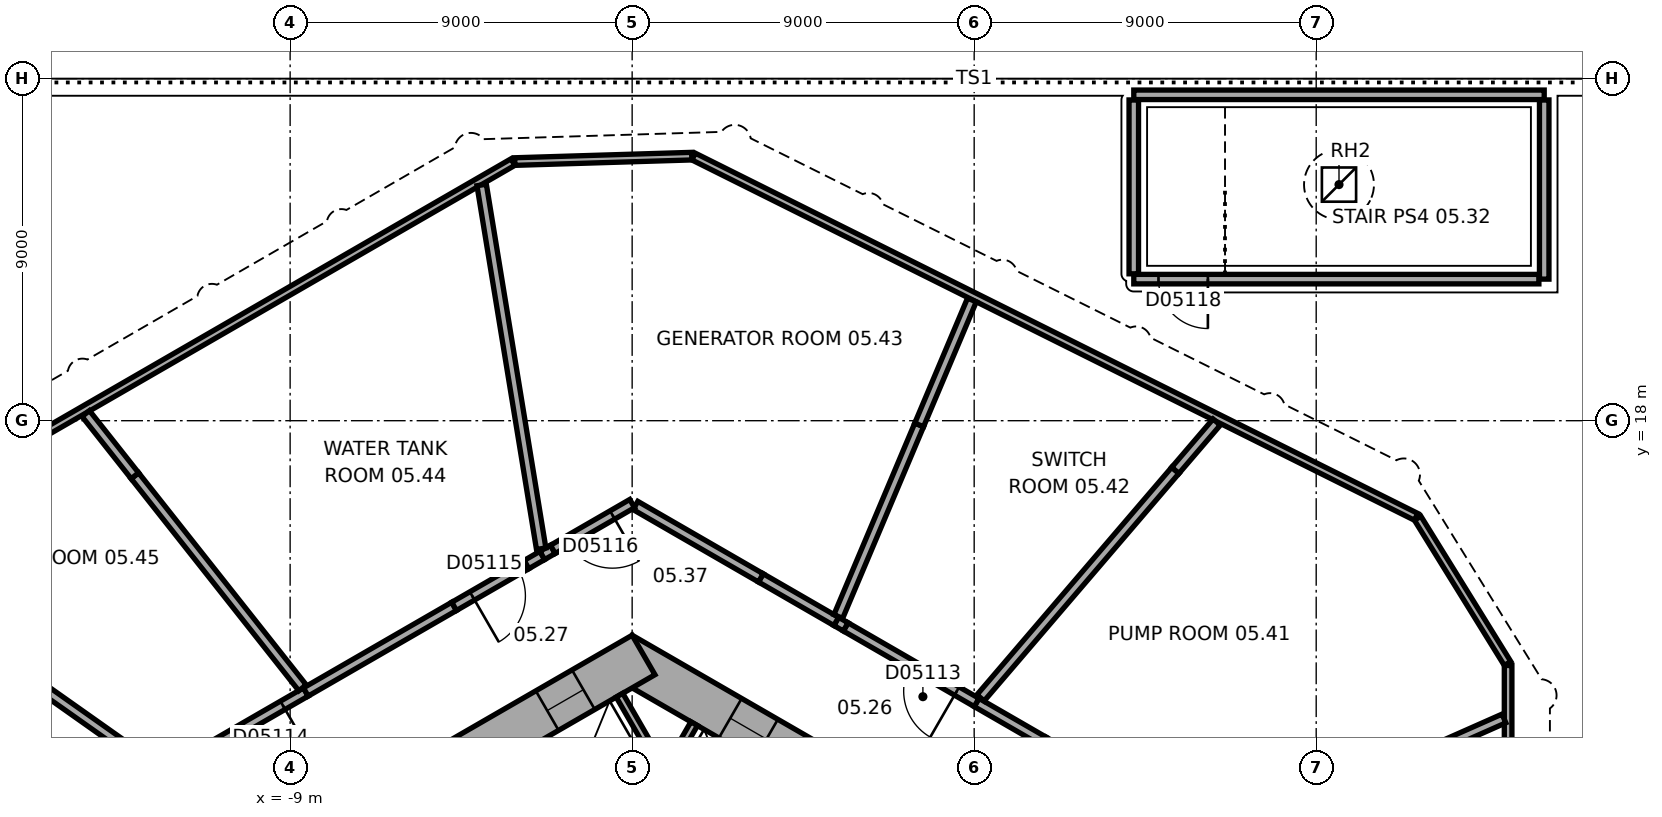
"""IFC4 building model, lengths in metres.
Left out: names, types, materials, properties, quantities, classifications, styles, units other than length and angle.
Written with IfcOpenShell. Run it as: python <this file> out.ifc"""

import sys

from ifc_helpers import new_model, si_unit, direction, frame, frame_2d, origin, origin_2d, place, context, subcontext, project, spatial, rectangle, extrude, element, fill, save


model = new_model("IFC4")
c1 = context("Model", 3, precision=1e-05, world=origin(), true_north=direction((0.0, 1.0)))
c2 = subcontext(c1, "Body", "Model", "MODEL_VIEW")
j1 = project(units=[si_unit("LENGTHUNIT", "METRE"), si_unit("PLANEANGLEUNIT", "RADIAN")], contexts=[c1])
p1 = place(None, origin())
s1 = spatial("IfcSite", under=j1, at=p1, CompositionType="ELEMENT")
p2 = place(p1, origin())
s2 = spatial("IfcBuilding", under=s1, at=p2, CompositionType="ELEMENT")
p3 = place(p2, frame((0.0, 0.0, 34.5)))
s3 = spatial("IfcBuildingStorey", under=s2, at=p3, CompositionType="ELEMENT", Elevation=34.5)
p4 = place(p3, frame((10.4, 5.658, 0.0), z_axis=(0.0, 0.0, 1.0), x_axis=(-0.866021384402, 0.500006961711, 0.0)))
e1 = element("IfcWall", 1, at=p4, inside=s3, PredefinedType="SHEAR", context=c2, shape_type="SweptSolid", body=[
    extrude(rectangle(XDim=12.355, YDim=1.2, at=frame_2d((6.178, 0.0))), origin(), (0.0, 0.0, 1.0), 4.5),
])
p5 = place(p4, frame((2.728, 0.0, 0.0)))
e2 = element("IfcOpeningElement", 2, at=p5, cuts=e1, PredefinedType="OPENING", context=c2, shape_type="SweptSolid", body=[
    extrude(rectangle(XDim=1.1, YDim=2.1, at=frame_2d((0.55, 1.05))), frame((0.0, 0.61, 0.0), z_axis=(0.0, -1.0, 0.0), x_axis=(1.0, 0.0, 0.0)), (0.0, 0.0, 1.0), 1.22),
])
p6 = place(p4, frame((5.328, 0.0, 0.0)))
e3 = element("IfcOpeningElement", 3, at=p6, cuts=e1, PredefinedType="OPENING", context=c2, shape_type="SweptSolid", body=[
    extrude(rectangle(XDim=1.1, YDim=2.1, at=frame_2d((0.55, 1.05))), frame((0.0, 0.61, 0.0), z_axis=(0.0, -1.0, 0.0), x_axis=(1.0, 0.0, 0.0)), (0.0, 0.0, 1.0), 1.22),
])
p7 = place(p4, frame((7.928, 0.0, 0.0)))
e4 = element("IfcOpeningElement", 4, at=p7, cuts=e1, PredefinedType="OPENING", context=c2, shape_type="SweptSolid", body=[
    extrude(rectangle(XDim=1.1, YDim=2.1, at=frame_2d((0.55, 1.05))), frame((0.0, 0.61, 0.0), z_axis=(0.0, -1.0, 0.0), x_axis=(1.0, 0.0, 0.0)), (0.0, 0.0, 1.0), 1.22),
])
p8 = place(p3, frame((0.3, 11.836, 0.0), z_axis=(0.0, 0.0, 1.0), x_axis=(-0.866021384402, -0.500006961711, 0.0)))
e5 = element("IfcWall", 5, at=p8, inside=s3, PredefinedType="SHEAR", context=c2, shape_type="SweptSolid", body=[
    extrude(rectangle(XDim=12.355, YDim=1.2, at=frame_2d((6.178, 0.0))), origin(), (0.0, 0.0, 1.0), 4.5),
])
p9 = place(p8, frame((6.378, 0.0, 0.0)))
e6 = element("IfcOpeningElement", 6, at=p9, cuts=e5, PredefinedType="OPENING", context=c2, shape_type="SweptSolid", body=[
    extrude(rectangle(XDim=1.5, YDim=2.1, at=frame_2d((0.75, 1.05))), frame((0.0, 0.61, 0.0), z_axis=(0.0, -1.0, 0.0), x_axis=(1.0, 0.0, 0.0)), (0.0, 0.0, 1.0), 1.22),
])
p10 = place(p8, frame((1.828, 0.0, 0.0)))
e7 = element("IfcOpeningElement", 7, at=p10, cuts=e5, PredefinedType="OPENING", context=c2, shape_type="SweptSolid", body=[
    extrude(rectangle(XDim=1.1, YDim=2.1, at=frame_2d((0.55, 1.05))), frame((0.0, 0.61, 0.0), z_axis=(0.0, -1.0, 0.0), x_axis=(1.0, 0.0, 0.0)), (0.0, 0.0, 1.0), 1.22),
])
p11 = place(p3, frame((23.05, -9.687, 0.0), z_axis=(0.0, 0.0, 1.0), x_axis=(0.0, 1.0, 0.0)))
e8 = element("IfcWall", 8, at=p11, inside=s3, PredefinedType="STANDARD", context=c2, shape_type="SweptSolid", body=[
    extrude(rectangle(XDim=21.246, YDim=0.2, at=frame_2d((10.623, 0.0))), origin(), (0.0, 0.0, 1.0), 4.5),
])
p12 = place(p11, frame((10.034, 0.0, 0.0)))
e9 = element("IfcOpeningElement", 9, at=p12, cuts=e8, PredefinedType="OPENING", context=c2, shape_type="SweptSolid", body=[
    extrude(rectangle(XDim=1.8, YDim=2.4, at=frame_2d((0.9, 1.2))), frame((0.0, 0.11, 0.0), z_axis=(0.0, -1.0, 0.0), x_axis=(1.0, 0.0, 0.0)), (0.0, 0.0, 1.0), 0.22),
])
p13 = place(p3, frame((23.035, 11.612, 0.0), z_axis=(0.0, 0.0, 1.0), x_axis=(-0.526160091227, 0.850385535155, 0.0)))
e10 = element("IfcWall", 10, at=p13, inside=s3, PredefinedType="STANDARD", context=c2, shape_type="SweptSolid", body=[
    extrude(rectangle(XDim=4.494, YDim=0.2, at=frame_2d((2.247, 0.0))), origin(), (0.0, 0.0, 1.0), 4.5),
])
p14 = place(p3, frame((20.63, 15.47, 0.0), z_axis=(0.0, 0.0, 1.0), x_axis=(-0.894934518609, 0.446197498203, 0.0)))
e11 = element("IfcWall", 11, at=p14, inside=s3, PredefinedType="STANDARD", context=c2, shape_type="SweptSolid", body=[
    extrude(rectangle(XDim=21.246, YDim=0.2, at=frame_2d((10.623, 0.0))), origin(), (0.0, 0.0, 1.0), 4.5),
])
p15 = place(p3, frame((1.568, 24.961, 0.0), z_axis=(0.0, 0.0, 1.0), x_axis=(-0.999533359013, -0.030546099927, 0.0)))
e12 = element("IfcWall", 12, at=p15, inside=s3, PredefinedType="STANDARD", context=c2, shape_type="SweptSolid", body=[
    extrude(rectangle(XDim=4.66, YDim=0.2, at=frame_2d((2.33, 0.0))), origin(), (0.0, 0.0, 1.0), 4.5),
])
p16 = place(p3, frame((-3.136, 24.805, 0.0), z_axis=(0.0, 0.0, 1.0), x_axis=(-0.866028291626, -0.499994998079, 0.0)))
e13 = element("IfcWall", 13, at=p16, inside=s3, PredefinedType="STANDARD", context=c2, shape_type="SweptSolid", body=[
    extrude(rectangle(XDim=21.246, YDim=0.2, at=frame_2d((10.623, 0.0))), origin(), (0.0, 0.0, 1.0), 4.5),
])
p17 = place(p3, frame((0.532, 8.122, 0.0), z_axis=(0.0, 0.0, 1.0), x_axis=(0.500077893725, 0.86598042715, 0.0)))
e14 = element("IfcWall", 14, at=p17, inside=s3, PredefinedType="PARTITIONING", context=c2, shape_type="SweptSolid", body=[
    extrude(rectangle(XDim=2.2, YDim=0.2, at=frame_2d((1.1, 0.0))), origin(), (0.0, 0.0, 1.0), 4.2),
])
p18 = place(p3, frame((0.767, 8.872, 0.0), z_axis=(0.0, 0.0, 1.0), x_axis=(-0.499994660107, 0.866028486751, 0.0)))
e15 = element("IfcWall", 15, at=p18, inside=s3, PredefinedType="PARTITIONING", context=c2, shape_type="SweptSolid", body=[
    extrude(rectangle(XDim=2.2, YDim=0.2, at=frame_2d((1.1, 0.0))), origin(), (0.0, 0.0, 1.0), 4.2),
])
p19 = place(p3, frame((13.883, 6.152, 0.0), z_axis=(0.0, 0.0, 1.0), x_axis=(0.914277420945, 0.405088629254, 0.0)))
e16 = element("IfcWall", 16, at=p19, inside=s3, PredefinedType="SOLIDWALL", context=c2, shape_type="SweptSolid", body=[
    extrude(rectangle(XDim=9.906, YDim=0.25, at=frame_2d((4.953, 0.0))), origin(), (0.0, 0.0, 1.0), 4.2),
])
p20 = place(p3, frame((10.833, 9.564, 0.0), z_axis=(0.0, 0.0, 1.0), x_axis=(-0.866058244174, 0.499943114462, 0.0)))
e17 = element("IfcWall", 17, at=p20, inside=s3, PredefinedType="SOLIDWALL", context=c2, shape_type="SweptSolid", body=[
    extrude(rectangle(XDim=2.043, YDim=0.25, at=frame_2d((1.021, 0.0))), origin(), (0.0, 0.0, 1.0), 4.2),
])
p21 = place(p3, frame((9.064, 10.586, 0.0), z_axis=(0.0, 0.0, 1.0), x_axis=(-0.865998553266, 0.500046503579, 0.0)))
e18 = element("IfcWall", 18, at=p21, inside=s3, PredefinedType="SOLIDWALL", context=c2, shape_type="SweptSolid", body=[
    extrude(rectangle(XDim=3.978, YDim=0.25, at=frame_2d((1.989, 0.0))), origin(), (0.0, 0.0, 1.0), 4.2),
])
p22 = place(p21, frame((0.6, 0.0, 0.0)))
e19 = element("IfcOpeningElement", 19, at=p22, cuts=e18, PredefinedType="OPENING", context=c2, shape_type="SweptSolid", body=[
    extrude(rectangle(XDim=1.4, YDim=2.1, at=frame_2d((0.7, 1.05))), frame((0.0, 0.135, 0.0), z_axis=(0.0, -1.0, 0.0), x_axis=(1.0, 0.0, 0.0)), (0.0, 0.0, 1.0), 0.27),
])
p23 = place(p3, frame((-8.587, 10.862, 0.0), z_axis=(0.0, 0.0, 1.0), x_axis=(-0.86601248742, -0.500022371132, 0.0)))
e20 = element("IfcWall", 20, at=p23, inside=s3, PredefinedType="SOLIDWALL", context=c2, shape_type="SweptSolid", body=[
    extrude(rectangle(XDim=3.124, YDim=0.25, at=frame_2d((1.562, 0.0))), origin(), (0.0, 0.0, 1.0), 4.2),
])
p24 = place(p23, frame((0.7, 0.0, 0.0)))
e21 = element("IfcOpeningElement", 21, at=p24, cuts=e20, PredefinedType="OPENING", context=c2, shape_type="SweptSolid", body=[
    extrude(rectangle(XDim=1.4, YDim=2.1, at=frame_2d((0.7, 1.05))), frame((0.0, 0.135, 0.0), z_axis=(0.0, -1.0, 0.0), x_axis=(1.0, 0.0, 0.0)), (0.0, 0.0, 1.0), 0.27),
])
p25 = place(p3, frame((-8.587, 10.862, 0.0), z_axis=(0.0, 0.0, 1.0), x_axis=(0.866020461467, 0.500008560247, 0.0)))
e22 = element("IfcWall", 22, at=p25, inside=s3, PredefinedType="SOLIDWALL", context=c2, shape_type="SweptSolid", body=[
    extrude(rectangle(XDim=4.506, YDim=0.25, at=frame_2d((2.253, 0.0))), origin(), (0.0, 0.0, 1.0), 4.2),
])
p26 = place(p3, frame((-15.707, 11.094, 0.0), z_axis=(0.0, 0.0, 1.0), x_axis=(0.816797900082, -0.576923903493, 0.0)))
e23 = element("IfcWall", 23, at=p26, inside=s3, PredefinedType="SOLIDWALL", context=c2, shape_type="SweptSolid", body=[
    extrude(rectangle(XDim=3.942, YDim=0.25, at=frame_2d((1.971, 0.0))), origin(), (0.0, 0.0, 1.0), 4.2),
])
p27 = place(p3, frame((5.619, 12.575, 0.0), z_axis=(0.0, 0.0, 1.0), x_axis=(-0.865775094499, 0.500433297998, 0.0)))
e24 = element("IfcWall", 24, at=p27, inside=s3, PredefinedType="SOLIDWALL", context=c2, shape_type="SweptSolid", body=[
    extrude(rectangle(XDim=0.287, YDim=0.25, at=frame_2d((0.144, 0.0))), origin(), (0.0, 0.0, 1.0), 4.2),
])
p28 = place(p3, frame((-4.685, 13.115, 0.0), z_axis=(0.0, 0.0, 1.0), x_axis=(0.866008176907, 0.50002983664, 0.0)))
e25 = element("IfcWall", 25, at=p28, inside=s3, PredefinedType="SOLIDWALL", context=c2, shape_type="SweptSolid", body=[
    extrude(rectangle(XDim=2.2, YDim=0.25, at=frame_2d((1.1, 0.0))), origin(), (0.0, 0.0, 1.0), 4.2),
])
p29 = place(p28, frame((0.55, 0.0, 0.0)))
e26 = element("IfcOpeningElement", 26, at=p29, cuts=e25, PredefinedType="OPENING", context=c2, shape_type="SweptSolid", body=[
    extrude(rectangle(XDim=1.4, YDim=2.1, at=frame_2d((0.7, 1.05))), frame((0.0, 0.135, 0.0), z_axis=(0.0, -1.0, 0.0), x_axis=(1.0, 0.0, 0.0)), (0.0, 0.0, 1.0), 0.27),
])
p30 = place(p3, frame((3.386, 13.865, 0.0), z_axis=(0.0, 0.0, 1.0), x_axis=(0.866031201001, -0.499989958791, 0.0)))
e27 = element("IfcWall", 27, at=p30, inside=s3, PredefinedType="SOLIDWALL", context=c2, shape_type="SweptSolid", body=[
    extrude(rectangle(XDim=2.291, YDim=0.25, at=frame_2d((1.146, 0.0))), origin(), (0.0, 0.0, 1.0), 4.2),
])
p31 = place(p3, frame((-2.78, 14.215, 0.0), z_axis=(0.0, 0.0, 1.0), x_axis=(0.866007328409, 0.500031306162, 0.0)))
e28 = element("IfcWall", 28, at=p31, inside=s3, PredefinedType="SOLIDWALL", context=c2, shape_type="SweptSolid", body=[
    extrude(rectangle(XDim=0.479, YDim=0.25, at=frame_2d((0.24, 0.0))), origin(), (0.0, 0.0, 1.0), 4.2),
])
p32 = place(p3, frame((-2.365, 14.454, 0.0), z_axis=(0.0, 0.0, 1.0), x_axis=(0.86622356696, 0.499656614129, 0.0)))
e29 = element("IfcWall", 29, at=p32, inside=s3, PredefinedType="SOLIDWALL", context=c2, shape_type="SweptSolid", body=[
    extrude(rectangle(XDim=0.321, YDim=0.25, at=frame_2d((0.161, 0.0))), origin(), (0.0, 0.0, 1.0), 4.2),
])
p33 = place(p3, frame((-2.394, 14.632, 0.0), z_axis=(0.0, 0.0, 1.0), x_axis=(-0.161467170833, 0.986878084032, 0.0)))
e30 = element("IfcWall", 30, at=p33, inside=s3, PredefinedType="SOLIDWALL", context=c2, shape_type="SweptSolid", body=[
    extrude(rectangle(XDim=9.698, YDim=0.25, at=frame_2d((4.849, 0.0))), origin(), (0.0, 0.0, 1.0), 3.4),
])
p34 = place(p3, frame((0.087, 15.77, 0.0), z_axis=(0.0, 0.0, 1.0), x_axis=(0.866006299436, -0.500033088242, 0.0)))
e31 = element("IfcWall", 31, at=p34, inside=s3, PredefinedType="SOLIDWALL", context=c2, shape_type="SweptSolid", body=[
    extrude(rectangle(XDim=3.81, YDim=0.25, at=frame_2d((1.905, 0.0))), origin(), (0.0, 0.0, 1.0), 4.2),
])
p35 = place(p3, frame((0.0, 15.82, 0.0), z_axis=(0.0, 0.0, 1.0), x_axis=(-0.86598987286, -0.500061536317, 0.0)))
e32 = element("IfcWall", 32, at=p35, inside=s3, PredefinedType="SOLIDWALL", context=c2, shape_type="SweptSolid", body=[
    extrude(rectangle(XDim=2.41, YDim=0.25, at=frame_2d((1.205, 0.0))), origin(), (0.0, 0.0, 1.0), 4.2),
])
p36 = place(p35, frame((0.6, 0.0, 0.0)))
e33 = element("IfcOpeningElement", 33, at=p36, cuts=e32, PredefinedType="OPENING", context=c2, shape_type="SweptSolid", body=[
    extrude(rectangle(XDim=1.4, YDim=2.1, at=frame_2d((0.7, 1.05))), frame((0.0, 0.135, 0.0), z_axis=(0.0, -1.0, 0.0), x_axis=(1.0, 0.0, 0.0)), (0.0, 0.0, 1.0), 0.27),
])
p37 = place(p3, frame((-13.085, 16.552, 0.0), z_axis=(0.0, 0.0, 1.0), x_axis=(0.620189417407, -0.784452093207, 0.0)))
e34 = element("IfcWall", 34, at=p37, inside=s3, PredefinedType="SOLIDWALL", context=c2, shape_type="SweptSolid", body=[
    extrude(rectangle(XDim=7.113, YDim=0.25, at=frame_2d((3.557, 0.0))), origin(), (0.0, 0.0, 1.0), 4.2),
])
p38 = place(p3, frame((-13.085, 16.552, 0.0), z_axis=(0.0, 0.0, 1.0), x_axis=(-0.620057979912, 0.784555990066, 0.0)))
e35 = element("IfcWall", 35, at=p38, inside=s3, PredefinedType="SOLIDWALL", context=c2, shape_type="SweptSolid", body=[
    extrude(rectangle(XDim=2.085, YDim=0.25, at=frame_2d((1.042, 0.0))), origin(), (0.0, 0.0, 1.0), 4.2),
])
p39 = place(p3, frame((14.293, 16.694, 0.0), z_axis=(0.0, 0.0, 1.0), x_axis=(-0.650375407049, -0.759612947432, 0.0)))
e36 = element("IfcWall", 36, at=p39, inside=s3, PredefinedType="SOLIDWALL", context=c2, shape_type="SweptSolid", body=[
    extrude(rectangle(XDim=7.88, YDim=0.25, at=frame_2d((3.94, 0.0))), origin(), (0.0, 0.0, 1.0), 4.2),
])
p40 = place(p3, frame((14.293, 16.694, 0.0), z_axis=(0.0, 0.0, 1.0), x_axis=(0.650490841035, 0.75951409844, 0.0)))
e37 = element("IfcWall", 37, at=p40, inside=s3, PredefinedType="SOLIDWALL", context=c2, shape_type="SweptSolid", body=[
    extrude(rectangle(XDim=1.673, YDim=0.25, at=frame_2d((0.836, 0.0))), origin(), (0.0, 0.0, 1.0), 4.2),
])
p41 = place(p3, frame((7.552, 17.889, 0.0), z_axis=(0.0, 0.0, 1.0), x_axis=(-0.38886264762, -0.921295740404, 0.0)))
e38 = element("IfcWall", 38, at=p41, inside=s3, PredefinedType="SOLIDWALL", context=c2, shape_type="SweptSolid", body=[
    extrude(rectangle(XDim=5.472, YDim=0.25, at=frame_2d((2.736, 0.0))), origin(), (0.0, 0.0, 1.0), 4.2),
])
p42 = place(p3, frame((7.552, 17.889, 0.0), z_axis=(0.0, 0.0, 1.0), x_axis=(0.388916536807, 0.921272992873, 0.0)))
e39 = element("IfcWall", 39, at=p42, inside=s3, PredefinedType="SOLIDWALL", context=c2, shape_type="SweptSolid", body=[
    extrude(rectangle(XDim=3.567, YDim=0.25, at=frame_2d((1.784, 0.0))), origin(), (0.0, 0.0, 1.0), 4.2),
])
p43 = place(p3, frame((23.86, 21.725, 0.0), z_axis=(0.0, 0.0, 1.0), x_axis=(-1.0, 0.0, 0.0)))
e40 = element("IfcWall", 40, at=p43, inside=s3, PredefinedType="SOLIDWALL", context=c2, shape_type="SweptSolid", body=[
    extrude(rectangle(XDim=10.66, YDim=0.25, at=frame_2d((5.33, 0.0))), origin(), (0.0, 0.0, 1.0), 4.2),
])
p44 = place(p43, frame((8.71, 0.0, 0.0)))
e41 = element("IfcOpeningElement", 41, at=p44, cuts=e40, PredefinedType="OPENING", context=c2, shape_type="SweptSolid", body=[
    extrude(rectangle(XDim=1.3, YDim=2.1, at=frame_2d((0.65, 1.05))), frame((0.0, 0.135, 0.0), z_axis=(0.0, -1.0, 0.0), x_axis=(1.0, 0.0, 0.0)), (0.0, 0.0, 1.0), 0.27),
])
p45 = place(p3, frame((13.2, 21.865, 0.0), z_axis=(0.0, 0.0, 1.0), x_axis=(0.0, 1.0, 0.0)))
e42 = element("IfcWall", 42, at=p45, inside=s3, PredefinedType="SOLIDWALL", context=c2, shape_type="SweptSolid", body=[
    extrude(rectangle(XDim=4.575, YDim=0.25, at=frame_2d((2.288, 0.0))), origin(), (0.0, 0.0, 1.0), 4.2),
])
p46 = place(p3, frame((24.0, 26.44, 0.0), z_axis=(0.0, 0.0, 1.0), x_axis=(0.0, -1.0, 0.0)))
e43 = element("IfcWall", 43, at=p46, inside=s3, PredefinedType="SOLIDWALL", context=c2, shape_type="SweptSolid", body=[
    extrude(rectangle(XDim=4.715, YDim=0.25, at=frame_2d((2.357, 0.0))), origin(), (0.0, 0.0, 1.0), 4.2),
])
p47 = place(p3, frame((24.0, 26.575, 0.0), z_axis=(0.0, 0.0, 1.0), x_axis=(-1.0, 0.0, 0.0)))
e44 = element("IfcWall", 44, at=p47, inside=s3, PredefinedType="SOLIDWALL", context=c2, shape_type="SweptSolid", body=[
    extrude(rectangle(XDim=10.8, YDim=0.25, at=frame_2d((5.4, 0.0))), origin(), (0.0, 0.0, 1.0), 4.2),
])
p48 = place(p7, origin())
e45 = element("IfcDoor", 45, at=p48, inside=s3, OperationType="DOUBLE_DOOR_SLIDING", PredefinedType="DOOR", context=c2, shape_type="SweptSolid", body=[
    extrude(rectangle(XDim=1.1, YDim=2.1, at=frame_2d((0.55, 1.05))), frame((0.0, 0.025, 0.0), z_axis=(0.0, -1.0, 0.0), x_axis=(1.0, 0.0, 0.0)), (0.0, 0.0, 1.0), 0.05),
])
fill(e4, e45)
p49 = place(p10, origin())
e46 = element("IfcDoor", 46, at=p49, inside=s3, OperationType="DOUBLE_DOOR_SLIDING", PredefinedType="DOOR", context=c2, shape_type="SweptSolid", body=[
    extrude(rectangle(XDim=1.1, YDim=2.1, at=frame_2d((0.55, 1.05))), frame((0.0, 0.025, 0.0), z_axis=(0.0, -1.0, 0.0), x_axis=(1.0, 0.0, 0.0)), (0.0, 0.0, 1.0), 0.05),
])
fill(e7, e46)
p50 = place(p22, origin())
e47 = element("IfcDoor", 47, at=p50, inside=s3, OperationType="SINGLE_SWING_LEFT", PredefinedType="DOOR", context=c2, shape_type="SweptSolid", body=[
    extrude(rectangle(XDim=1.4, YDim=2.1, at=frame_2d((0.7, 1.05))), frame((0.0, 0.025, 0.0), z_axis=(0.0, -1.0, 0.0), x_axis=(1.0, 0.0, 0.0)), (0.0, 0.0, 1.0), 0.05),
])
fill(e19, e47)
p51 = place(p24, origin())
e48 = element("IfcDoor", 48, at=p51, inside=s3, OperationType="SINGLE_SWING_LEFT", PredefinedType="DOOR", context=c2, shape_type="SweptSolid", body=[
    extrude(rectangle(XDim=1.4, YDim=2.1, at=frame_2d((0.7, 1.05))), frame((0.0, 0.025, 0.0), z_axis=(0.0, -1.0, 0.0), x_axis=(1.0, 0.0, 0.0)), (0.0, 0.0, 1.0), 0.05),
])
fill(e21, e48)
p52 = place(p29, origin())
e49 = element("IfcDoor", 49, at=p52, inside=s3, OperationType="SINGLE_SWING_LEFT", PredefinedType="DOOR", context=c2, shape_type="SweptSolid", body=[
    extrude(rectangle(XDim=1.4, YDim=2.1, at=frame_2d((0.7, 1.05))), frame((0.0, 0.025, 0.0), z_axis=(0.0, -1.0, 0.0), x_axis=(1.0, 0.0, 0.0)), (0.0, 0.0, 1.0), 0.05),
])
fill(e26, e49)
p53 = place(p36, origin())
e50 = element("IfcDoor", 50, at=p53, inside=s3, OperationType="SINGLE_SWING_LEFT", PredefinedType="DOOR", context=c2, shape_type="SweptSolid", body=[
    extrude(rectangle(XDim=1.4, YDim=2.1, at=frame_2d((0.7, 1.05))), frame((0.0, 0.025, 0.0), z_axis=(0.0, -1.0, 0.0), x_axis=(1.0, 0.0, 0.0)), (0.0, 0.0, 1.0), 0.05),
])
fill(e33, e50)
p54 = place(p44, origin())
e51 = element("IfcDoor", 51, at=p54, inside=s3, OperationType="SINGLE_SWING_LEFT", PredefinedType="DOOR", context=c2, shape_type="SweptSolid", body=[
    extrude(rectangle(XDim=1.3, YDim=2.1, at=frame_2d((0.65, 1.05))), frame((0.0, 0.025, 0.0), z_axis=(0.0, -1.0, 0.0), x_axis=(1.0, 0.0, 0.0)), (0.0, 0.0, 1.0), 0.05),
])
fill(e41, e51)
p55 = place(p3, frame((0.0, 0.0, 3.95)))
p56 = place(p55, frame((18.6, 24.212, -0.01)))
p57 = place(p56, frame((0.0, 0.0, 0.21)))
e52 = element("IfcWindow", 52, at=p57, inside=s3, PartitioningType="SINGLE_PANEL", PredefinedType="SKYLIGHT", context=c2, shape_type="SweptSolid", body=[
    extrude(rectangle(XDim=0.9, YDim=0.9, at=origin_2d()), origin(), (0.0, 0.0, 1.0), 0.05),
])
save(model, sys.argv[1])
